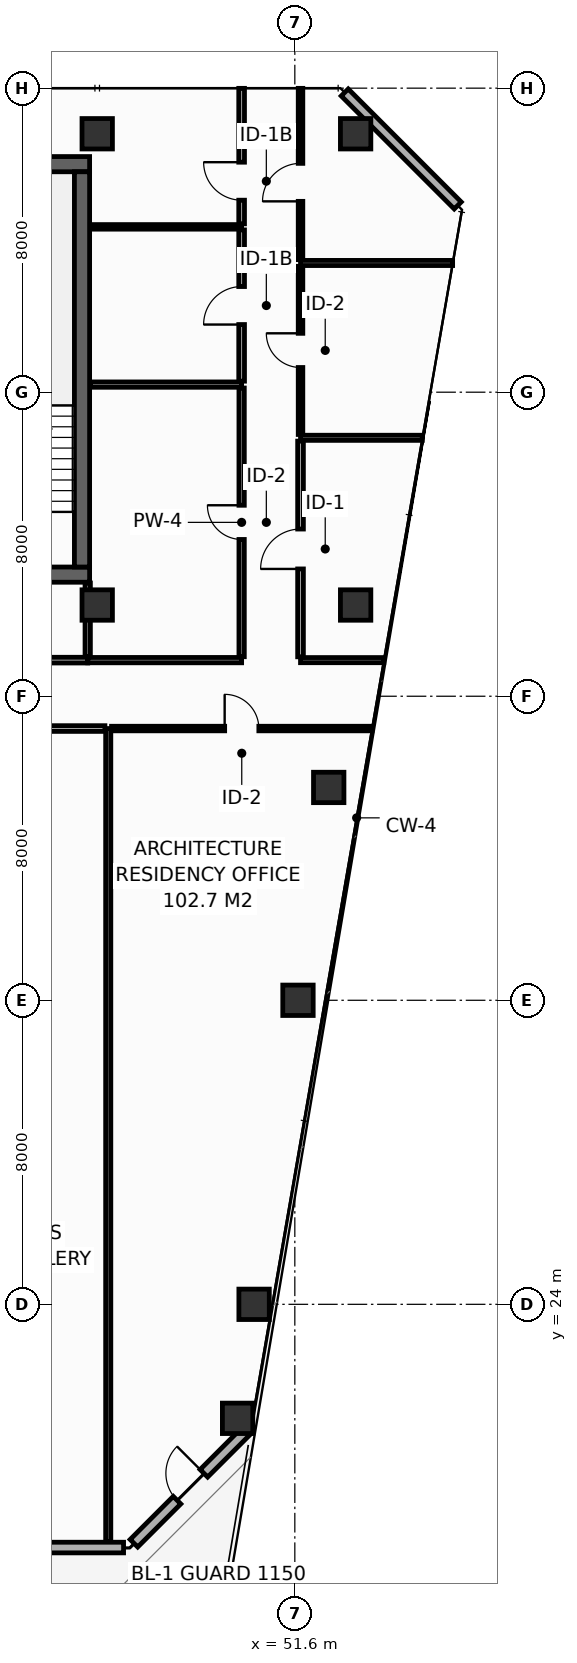
"""IFC4 building model, lengths in metres.
Left out: names, types, materials, properties, quantities, classifications, styles, units other than length and angle.
Written with IfcOpenShell. Run it as: python <this file> out.ifc"""

import sys

from ifc_helpers import new_model, si_unit, direction, frame, frame_2d, origin, origin_2d, place, context, subcontext, project, spatial, rectangle, hollow_rectangle, extrude, element, fill, save


model = new_model("IFC4")
c1 = context("Model", 3, precision=1e-05, world=origin(), true_north=direction((0.0, 1.0)))
c2 = subcontext(c1, "Body", "Model", "MODEL_VIEW")
j1 = project(units=[si_unit("LENGTHUNIT", "METRE"), si_unit("PLANEANGLEUNIT", "RADIAN")], contexts=[c1])
p1 = place(None, origin())
s1 = spatial("IfcSite", under=j1, at=p1, CompositionType="ELEMENT")
p2 = place(p1, origin())
s2 = spatial("IfcBuilding", under=s1, at=p2, CompositionType="ELEMENT")
p3 = place(p2, frame((0.0, 0.0, 230.6)))
s3 = spatial("IfcBuildingStorey", under=s2, at=p3, CompositionType="ELEMENT", Elevation=230.6)
p4 = place(p3, frame((13.7, 43.2, 0.0), z_axis=(0.0, 0.0, 1.0), x_axis=(1.0, 0.0, 0.0)))
e1 = element("IfcWall", 1, at=p4, inside=s3, PredefinedType="SHEAR", context=c2, shape_type="SweptSolid", body=[
    extrude(rectangle(XDim=32.5, YDim=0.4, at=frame_2d((16.25, 0.0))), origin(), (0.0, 0.0, 1.0), 3.55),
])
p5 = place(p4, frame((5.4, 0.0, 0.0)))
e2 = element("IfcOpeningElement", 2, at=p5, cuts=e1, PredefinedType="OPENING", context=c2, shape_type="SweptSolid", body=[
    extrude(rectangle(XDim=1.1, YDim=2.15, at=frame_2d((0.55, 1.075))), frame((0.0, 0.21, 0.0), z_axis=(0.0, -1.0, 0.0), x_axis=(1.0, 0.0, 0.0)), (0.0, 0.0, 1.0), 0.42),
])
p6 = place(p4, frame((25.6, 0.0, 0.0)))
e3 = element("IfcOpeningElement", 3, at=p6, cuts=e1, PredefinedType="OPENING", context=c2, shape_type="SweptSolid", body=[
    extrude(rectangle(XDim=1.1, YDim=2.15, at=frame_2d((0.55, 1.075))), frame((0.0, 0.21, 0.0), z_axis=(0.0, -1.0, 0.0), x_axis=(1.0, 0.0, 0.0)), (0.0, 0.0, 1.0), 0.42),
])
p7 = place(p3, frame((13.7, 54.0, 0.0), z_axis=(0.0, 0.0, 1.0), x_axis=(1.0, 0.0, 0.0)))
e4 = element("IfcWall", 4, at=p7, inside=s3, PredefinedType="SHEAR", context=c2, shape_type="SweptSolid", body=[
    extrude(rectangle(XDim=32.5, YDim=0.4, at=frame_2d((16.25, 0.0))), origin(), (0.0, 0.0, 1.0), 3.55),
])
p8 = place(p3, frame((46.0, 43.4, 0.0), z_axis=(0.0, 0.0, 1.0), x_axis=(0.0, 1.0, 0.0)))
e5 = element("IfcWall", 5, at=p8, inside=s3, PredefinedType="SHEAR", context=c2, shape_type="SweptSolid", body=[
    extrude(rectangle(XDim=10.4, YDim=0.4, at=frame_2d((5.2, 0.0))), origin(), (0.0, 0.0, 1.0), 3.55),
])
for number, where, z_axis, x_axis in (
    (6, (46.4, 54.8, 0.0), (0.0, 0.0, 1.0), (1.0, 0.0, 0.0)),
    (7, (53.2, 54.8, 0.0), (0.0, 0.0, 1.0), (1.0, 0.0, 0.0)),
    (8, (46.4, 42.4, 0.0), (0.0, 0.0, 1.0), (1.0, 0.0, 0.0)),
    (9, (53.2, 42.4, 0.0), (0.0, 0.0, 1.0), (1.0, 0.0, 0.0)),
    (10, (50.094, 21.0, 0.0), (0.0, 0.0, 1.0), (1.0, 0.0, 0.0)),
    (11, (50.528, 24.0, 0.0), (0.0, 0.0, 1.0), (1.0, 0.0, 0.0)),
    (12, (51.683, 32.0, 0.0), (0.0, 0.0, 1.0), (1.0, 0.0, 0.0)),
    (13, (52.492, 37.6, 0.0), (0.0, 0.0, 1.0), (1.0, 0.0, 0.0)),
):
    element("IfcColumn", number, at=place(p3, frame(where, z_axis=z_axis, x_axis=x_axis)), inside=s3, PredefinedType="COLUMN", context=c2, shape_type="SweptSolid", body=[
        extrude(hollow_rectangle(XDim=0.8, YDim=0.8, WallThickness=0.036, at=origin_2d()), origin(), (0.0, 0.0, 1.0), 3.8),
    ])
p9 = place(p3, frame((38.813, 17.6, 0.0), z_axis=(0.0, 0.0, 1.0), x_axis=(1.0, 0.0, 0.0)))
e14 = element("IfcWall", 14, at=p9, inside=s3, PredefinedType="STANDARD", context=c2, shape_type="SweptSolid", body=[
    extrude(rectangle(XDim=8.28, YDim=0.28, at=frame_2d((4.14, 0.0))), origin(), (0.0, 0.0, 1.0), 3.55),
])
p10 = place(p9, frame((3.64, 0.0, 0.0)))
e15 = element("IfcOpeningElement", 15, at=p10, cuts=e14, PredefinedType="OPENING", context=c2, shape_type="SweptSolid", body=[
    extrude(rectangle(XDim=1.0, YDim=2.2, at=frame_2d((0.5, 1.1))), frame((0.0, 0.15, 0.0), z_axis=(0.0, -1.0, 0.0), x_axis=(1.0, 0.0, 0.0)), (0.0, 0.0, 1.0), 0.3),
])
p11 = place(p3, frame((47.366, 17.713, 0.0), z_axis=(0.0, 0.0, 1.0), x_axis=(0.70707775441, 0.707135806771, 0.0)))
e16 = element("IfcWall", 16, at=p11, inside=s3, PredefinedType="STANDARD", context=c2, shape_type="SweptSolid", body=[
    extrude(rectangle(XDim=4.206, YDim=0.28, at=frame_2d((2.103, 0.0))), origin(), (0.0, 0.0, 1.0), 3.55),
])
p12 = place(p11, frame((1.603, 0.0, 0.0)))
e17 = element("IfcOpeningElement", 17, at=p12, cuts=e16, PredefinedType="OPENING", context=c2, shape_type="SweptSolid", body=[
    extrude(rectangle(XDim=1.0, YDim=2.2, at=frame_2d((0.5, 1.1))), frame((0.0, 0.15, 0.0), z_axis=(0.0, -1.0, 0.0), x_axis=(1.0, 0.0, 0.0)), (0.0, 0.0, 1.0), 0.3),
])
p13 = place(p3, frame((55.887, 52.913, 0.0), z_axis=(0.0, 0.0, 1.0), x_axis=(-0.707106781187, 0.707106781187, 0.0)))
e18 = element("IfcWall", 18, at=p13, inside=s3, PredefinedType="STANDARD", context=c2, shape_type="SweptSolid", body=[
    extrude(rectangle(XDim=4.206, YDim=0.26, at=frame_2d((2.103, 0.0))), origin(), (0.0, 0.0, 1.0), 3.55),
])
p14 = place(p3, frame((46.15, 40.95, 0.0), z_axis=(0.0, 0.0, 1.0), x_axis=(1.0, 0.0, 0.0)))
e19 = element("IfcWall", 19, at=p14, inside=s3, PredefinedType="PARTITIONING", context=c2, shape_type="SweptSolid", body=[
    extrude(rectangle(XDim=4.05, YDim=0.14, at=frame_2d((2.025, 0.0))), origin(), (0.0, 0.0, 1.0), 3.55),
])
p15 = place(p3, frame((46.15, 41.04, 0.0), z_axis=(0.0, 0.0, 1.0), x_axis=(0.0, 1.0, 0.0)))
e20 = element("IfcWall", 20, at=p15, inside=s3, PredefinedType="PARTITIONING", context=c2, shape_type="SweptSolid", body=[
    extrude(rectangle(XDim=1.94, YDim=0.14, at=frame_2d((0.97, 0.0))), origin(), (0.0, 0.0, 1.0), 3.55),
])
p16 = place(p3, frame((46.22, 48.2, 0.0), z_axis=(0.0, 0.0, 1.0), x_axis=(1.0, 0.0, 0.0)))
e21 = element("IfcWall", 21, at=p16, inside=s3, PredefinedType="PARTITIONING", context=c2, shape_type="SweptSolid", body=[
    extrude(rectangle(XDim=3.98, YDim=0.14, at=frame_2d((1.99, 0.0))), origin(), (0.0, 0.0, 1.0), 3.55),
])
p17 = place(p3, frame((50.2, 41.04, 0.0), z_axis=(0.0, 0.0, 1.0), x_axis=(0.0, 1.0, 0.0)))
e22 = element("IfcWall", 22, at=p17, inside=s3, PredefinedType="PARTITIONING", context=c2, shape_type="SweptSolid", body=[
    extrude(rectangle(XDim=7.07, YDim=0.14, at=frame_2d((3.535, 0.0))), origin(), (0.0, 0.0, 1.0), 2.947),
])
p18 = place(p17, frame((3.085, 0.0, 0.0)))
e23 = element("IfcOpeningElement", 23, at=p18, cuts=e22, PredefinedType="OPENING", context=c2, shape_type="SweptSolid", body=[
    extrude(rectangle(XDim=0.9, YDim=2.1, at=frame_2d((0.45, 1.05))), frame((0.0, 0.08, 0.0), z_axis=(0.0, -1.0, 0.0), x_axis=(1.0, 0.0, 0.0)), (0.0, 0.0, 1.0), 0.16),
])
p19 = place(p3, frame((46.22, 52.35, 0.0), z_axis=(0.0, 0.0, 1.0), x_axis=(1.0, 0.0, 0.0)))
e24 = element("IfcWall", 24, at=p19, inside=s3, PredefinedType="PARTITIONING", context=c2, shape_type="SweptSolid", body=[
    extrude(rectangle(XDim=3.98, YDim=0.12, at=frame_2d((1.99, 0.0))), origin(), (0.0, 0.0, 1.0), 3.55),
])
p20 = place(p3, frame((50.2, 48.29, 0.0), z_axis=(0.0, 0.0, 1.0), x_axis=(0.0, 1.0, 0.0)))
e25 = element("IfcWall", 25, at=p20, inside=s3, PredefinedType="PARTITIONING", context=c2, shape_type="SweptSolid", body=[
    extrude(rectangle(XDim=3.98, YDim=0.15, at=frame_2d((1.99, 0.0))), origin(), (0.0, 0.0, 1.0), 3.55),
])
p21 = place(p20, frame((1.49, 0.0, 0.0)))
e26 = element("IfcOpeningElement", 26, at=p21, cuts=e25, PredefinedType="OPENING", context=c2, shape_type="SweptSolid", body=[
    extrude(rectangle(XDim=1.0, YDim=2.15, at=frame_2d((0.5, 1.075))), frame((0.0, 0.085, 0.0), z_axis=(0.0, -1.0, 0.0), x_axis=(1.0, 0.0, 0.0)), (0.0, 0.0, 1.0), 0.17),
])
p22 = place(p3, frame((50.2, 52.43, 0.0), z_axis=(0.0, 0.0, 1.0), x_axis=(0.0, 1.0, 0.0)))
e27 = element("IfcWall", 27, at=p22, inside=s3, PredefinedType="PARTITIONING", context=c2, shape_type="SweptSolid", body=[
    extrude(rectangle(XDim=3.565, YDim=0.15, at=frame_2d((1.783, 0.0))), origin(), (0.0, 0.0, 1.0), 2.935),
])
p23 = place(p22, frame((0.622, 0.0, 0.0)))
e28 = element("IfcOpeningElement", 28, at=p23, cuts=e27, PredefinedType="OPENING", context=c2, shape_type="SweptSolid", body=[
    extrude(rectangle(XDim=1.0, YDim=2.15, at=frame_2d((0.5, 1.075))), frame((0.0, 0.085, 0.0), z_axis=(0.0, -1.0, 0.0), x_axis=(1.0, 0.0, 0.0)), (0.0, 0.0, 1.0), 0.17),
])
p24 = place(p3, frame((51.75, 40.95, 0.0), z_axis=(0.0, 0.0, 1.0), x_axis=(1.0, 0.0, 0.0)))
e29 = element("IfcWall", 29, at=p24, inside=s3, PredefinedType="PARTITIONING", context=c2, shape_type="SweptSolid", body=[
    extrude(rectangle(XDim=2.191, YDim=0.135, at=frame_2d((1.095, 0.0))), origin(), (0.0, 0.0, 1.0), 3.085),
])
p25 = place(p3, frame((51.75, 46.8, 0.0), z_axis=(0.0, 0.0, 1.0), x_axis=(1.0, 0.0, 0.0)))
e30 = element("IfcWall", 30, at=p25, inside=s3, PredefinedType="PARTITIONING", context=c2, shape_type="SweptSolid", body=[
    extrude(rectangle(XDim=3.205, YDim=0.135, at=frame_2d((1.603, 0.0))), origin(), (0.0, 0.0, 1.0), 2.947),
])
p26 = place(p3, frame((51.75, 51.4, 0.0), z_axis=(0.0, 0.0, 1.0), x_axis=(1.0, 0.0, 0.0)))
e31 = element("IfcWall", 31, at=p26, inside=s3, PredefinedType="PARTITIONING", context=c2, shape_type="SweptSolid", body=[
    extrude(rectangle(XDim=4.002, YDim=0.135, at=frame_2d((2.001, 0.0))), origin(), (0.0, 0.0, 1.0), 2.947),
])
p27 = place(p3, frame((51.75, 41.038, 0.0), z_axis=(0.0, 0.0, 1.0), x_axis=(0.0, 1.0, 0.0)))
e32 = element("IfcWall", 32, at=p27, inside=s3, PredefinedType="PARTITIONING", context=c2, shape_type="SweptSolid", body=[
    extrude(rectangle(XDim=5.675, YDim=0.15, at=frame_2d((2.837, 0.0))), origin(), (0.0, 0.0, 1.0), 2.947),
])
p28 = place(p27, frame((2.312, 0.0, 0.0)))
e33 = element("IfcOpeningElement", 33, at=p28, cuts=e32, PredefinedType="OPENING", context=c2, shape_type="SweptSolid", body=[
    extrude(rectangle(XDim=1.05, YDim=2.15, at=frame_2d((0.525, 1.075))), frame((0.0, 0.085, 0.0), z_axis=(0.0, -1.0, 0.0), x_axis=(1.0, 0.0, 0.0)), (0.0, 0.0, 1.0), 0.17),
])
p29 = place(p3, frame((51.75, 46.887, 0.0), z_axis=(0.0, 0.0, 1.0), x_axis=(0.0, 1.0, 0.0)))
e34 = element("IfcWall", 34, at=p29, inside=s3, PredefinedType="PARTITIONING", context=c2, shape_type="SweptSolid", body=[
    extrude(rectangle(XDim=4.425, YDim=0.12, at=frame_2d((2.212, 0.0))), origin(), (0.0, 0.0, 1.0), 3.55),
])
p30 = place(p29, frame((1.762, 0.0, 0.0)))
e35 = element("IfcOpeningElement", 35, at=p30, cuts=e34, PredefinedType="OPENING", context=c2, shape_type="SweptSolid", body=[
    extrude(rectangle(XDim=0.9, YDim=2.1, at=frame_2d((0.45, 1.05))), frame((0.0, 0.07, 0.0), z_axis=(0.0, -1.0, 0.0), x_axis=(1.0, 0.0, 0.0)), (0.0, 0.0, 1.0), 0.14),
])
p31 = place(p3, frame((51.75, 51.488, 0.0), z_axis=(0.0, 0.0, 1.0), x_axis=(0.0, 1.0, 0.0)))
e36 = element("IfcWall", 36, at=p31, inside=s3, PredefinedType="PARTITIONING", context=c2, shape_type="SweptSolid", body=[
    extrude(rectangle(XDim=4.508, YDim=0.12, at=frame_2d((2.254, 0.0))), origin(), (0.0, 0.0, 1.0), 2.935),
])
p32 = place(p31, frame((1.534, 0.0, 0.0)))
e37 = element("IfcOpeningElement", 37, at=p32, cuts=e36, PredefinedType="OPENING", context=c2, shape_type="SweptSolid", body=[
    extrude(rectangle(XDim=1.0, YDim=2.15, at=frame_2d((0.5, 1.075))), frame((0.0, 0.07, 0.0), z_axis=(0.0, -1.0, 0.0), x_axis=(1.0, 0.0, 0.0)), (0.0, 0.0, 1.0), 0.14),
])
p33 = place(p3, frame((40.995, 40.95, 0.0), z_axis=(0.0, 0.0, 1.0), x_axis=(1.0, 0.0, 0.0)))
e38 = element("IfcWall", 38, at=p33, inside=s3, PredefinedType="PARTITIONING", context=c2, shape_type="SweptSolid", body=[
    extrude(rectangle(XDim=5.155, YDim=0.15, at=frame_2d((2.577, 0.0))), origin(), (0.0, 0.0, 1.0), 3.55),
])
p34 = place(p33, frame((2.078, 0.0, 0.0)))
e39 = element("IfcOpeningElement", 39, at=p34, cuts=e38, PredefinedType="OPENING", context=c2, shape_type="SweptSolid", body=[
    extrude(rectangle(XDim=1.0, YDim=2.15, at=frame_2d((0.5, 1.075))), frame((0.0, 0.085, 0.0), z_axis=(0.0, -1.0, 0.0), x_axis=(1.0, 0.0, 0.0)), (0.0, 0.0, 1.0), 0.17),
])
p35 = place(p3, frame((46.69, 17.76, 0.0), z_axis=(0.0, 0.0, 1.0), x_axis=(0.0, 1.0, 0.0)))
e40 = element("IfcWall", 40, at=p35, inside=s3, PredefinedType="PARTITIONING", context=c2, shape_type="SweptSolid", body=[
    extrude(rectangle(XDim=21.39, YDim=0.135, at=frame_2d((10.695, 0.0))), origin(), (0.0, 0.0, 1.0), 2.947),
])
p36 = place(p3, frame((41.048, 39.15, 0.0), z_axis=(0.0, 0.0, 1.0), x_axis=(1.0, 0.0, 0.0)))
e41 = element("IfcWall", 41, at=p36, inside=s3, PredefinedType="PARTITIONING", context=c2, shape_type="SweptSolid", body=[
    extrude(rectangle(XDim=5.555, YDim=0.15, at=frame_2d((2.777, 0.0))), origin(), (0.0, 0.0, 1.0), 3.55),
])
p37 = place(p36, frame((2.252, 0.0, 0.0)))
e42 = element("IfcOpeningElement", 42, at=p37, cuts=e41, PredefinedType="OPENING", context=c2, shape_type="SweptSolid", body=[
    extrude(rectangle(XDim=1.05, YDim=2.15, at=frame_2d((0.525, 1.075))), frame((0.0, 0.085, 0.0), z_axis=(0.0, -1.0, 0.0), x_axis=(1.0, 0.0, 0.0)), (0.0, 0.0, 1.0), 0.17),
])
p38 = place(p3, frame((46.778, 39.15, 0.0), z_axis=(0.0, 0.0, 1.0), x_axis=(1.0, 0.0, 0.0)))
e43 = element("IfcWall", 43, at=p38, inside=s3, PredefinedType="PARTITIONING", context=c2, shape_type="SweptSolid", body=[
    extrude(rectangle(XDim=6.851, YDim=0.12, at=frame_2d((3.426, 0.0))), origin(), (0.0, 0.0, 1.0), 3.085),
])
p39 = place(p38, frame((2.976, 0.0, 0.0)))
e44 = element("IfcOpeningElement", 44, at=p39, cuts=e43, PredefinedType="OPENING", context=c2, shape_type="SweptSolid", body=[
    extrude(rectangle(XDim=0.9, YDim=2.1, at=frame_2d((0.45, 1.05))), frame((0.0, 0.07, 0.0), z_axis=(0.0, -1.0, 0.0), x_axis=(1.0, 0.0, 0.0)), (0.0, 0.0, 1.0), 0.14),
])
p40 = place(p12, origin())
e45 = element("IfcDoor", 45, at=p40, inside=s3, OperationType="SINGLE_SWING_RIGHT", PredefinedType="DOOR", context=c2, shape_type="SweptSolid", body=[
    extrude(rectangle(XDim=1.0, YDim=2.2, at=frame_2d((0.5, 1.1))), frame((0.0, 0.025, 0.0), z_axis=(0.0, -1.0, 0.0), x_axis=(1.0, 0.0, 0.0)), (0.0, 0.0, 1.0), 0.05),
])
fill(e17, e45)
p41 = place(p18, origin())
e46 = element("IfcDoor", 46, at=p41, inside=s3, OperationType="SINGLE_SWING_RIGHT", PredefinedType="DOOR", context=c2, shape_type="SweptSolid", body=[
    extrude(rectangle(XDim=0.9, YDim=2.1, at=frame_2d((0.45, 1.05))), frame((0.0, 0.025, 0.0), z_axis=(0.0, -1.0, 0.0), x_axis=(1.0, 0.0, 0.0)), (0.0, 0.0, 1.0), 0.05),
])
fill(e23, e46)
p42 = place(p21, origin())
e47 = element("IfcDoor", 47, at=p42, inside=s3, OperationType="SINGLE_SWING_LEFT", PredefinedType="DOOR", context=c2, shape_type="SweptSolid", body=[
    extrude(rectangle(XDim=1.0, YDim=2.15, at=frame_2d((0.5, 1.075))), frame((0.0, 0.025, 0.0), z_axis=(0.0, -1.0, 0.0), x_axis=(1.0, 0.0, 0.0)), (0.0, 0.0, 1.0), 0.05),
])
fill(e26, e47)
p43 = place(p23, origin())
e48 = element("IfcDoor", 48, at=p43, inside=s3, OperationType="SINGLE_SWING_RIGHT", PredefinedType="DOOR", context=c2, shape_type="SweptSolid", body=[
    extrude(rectangle(XDim=1.0, YDim=2.15, at=frame_2d((0.5, 1.075))), frame((0.0, 0.025, 0.0), z_axis=(0.0, -1.0, 0.0), x_axis=(1.0, 0.0, 0.0)), (0.0, 0.0, 1.0), 0.05),
])
fill(e28, e48)
p44 = place(p28, origin())
e49 = element("IfcDoor", 49, at=p44, inside=s3, OperationType="SINGLE_SWING_LEFT", PredefinedType="DOOR", context=c2, shape_type="SweptSolid", body=[
    extrude(rectangle(XDim=1.05, YDim=2.15, at=frame_2d((0.525, 1.075))), frame((0.0, 0.025, 0.0), z_axis=(0.0, -1.0, 0.0), x_axis=(1.0, 0.0, 0.0)), (0.0, 0.0, 1.0), 0.05),
])
fill(e33, e49)
p45 = place(p30, origin())
e50 = element("IfcDoor", 50, at=p45, inside=s3, OperationType="SINGLE_SWING_RIGHT", PredefinedType="DOOR", context=c2, shape_type="SweptSolid", body=[
    extrude(rectangle(XDim=0.9, YDim=2.1, at=frame_2d((0.45, 1.05))), frame((0.0, 0.025, 0.0), z_axis=(0.0, -1.0, 0.0), x_axis=(1.0, 0.0, 0.0)), (0.0, 0.0, 1.0), 0.05),
])
fill(e35, e50)
p46 = place(p32, origin())
e51 = element("IfcDoor", 51, at=p46, inside=s3, OperationType="SINGLE_SWING_LEFT", PredefinedType="DOOR", context=c2, shape_type="SweptSolid", body=[
    extrude(rectangle(XDim=1.0, YDim=2.15, at=frame_2d((0.5, 1.075))), frame((0.0, 0.025, 0.0), z_axis=(0.0, -1.0, 0.0), x_axis=(1.0, 0.0, 0.0)), (0.0, 0.0, 1.0), 0.05),
])
fill(e37, e51)
p47 = place(p39, origin())
e52 = element("IfcDoor", 52, at=p47, inside=s3, OperationType="SINGLE_SWING_LEFT", PredefinedType="DOOR", context=c2, shape_type="SweptSolid", body=[
    extrude(rectangle(XDim=0.9, YDim=2.1, at=frame_2d((0.45, 1.05))), frame((0.0, 0.025, 0.0), z_axis=(0.0, -1.0, 0.0), x_axis=(1.0, 0.0, 0.0)), (0.0, 0.0, 1.0), 0.05),
])
fill(e44, e52)
save(model, sys.argv[1])
